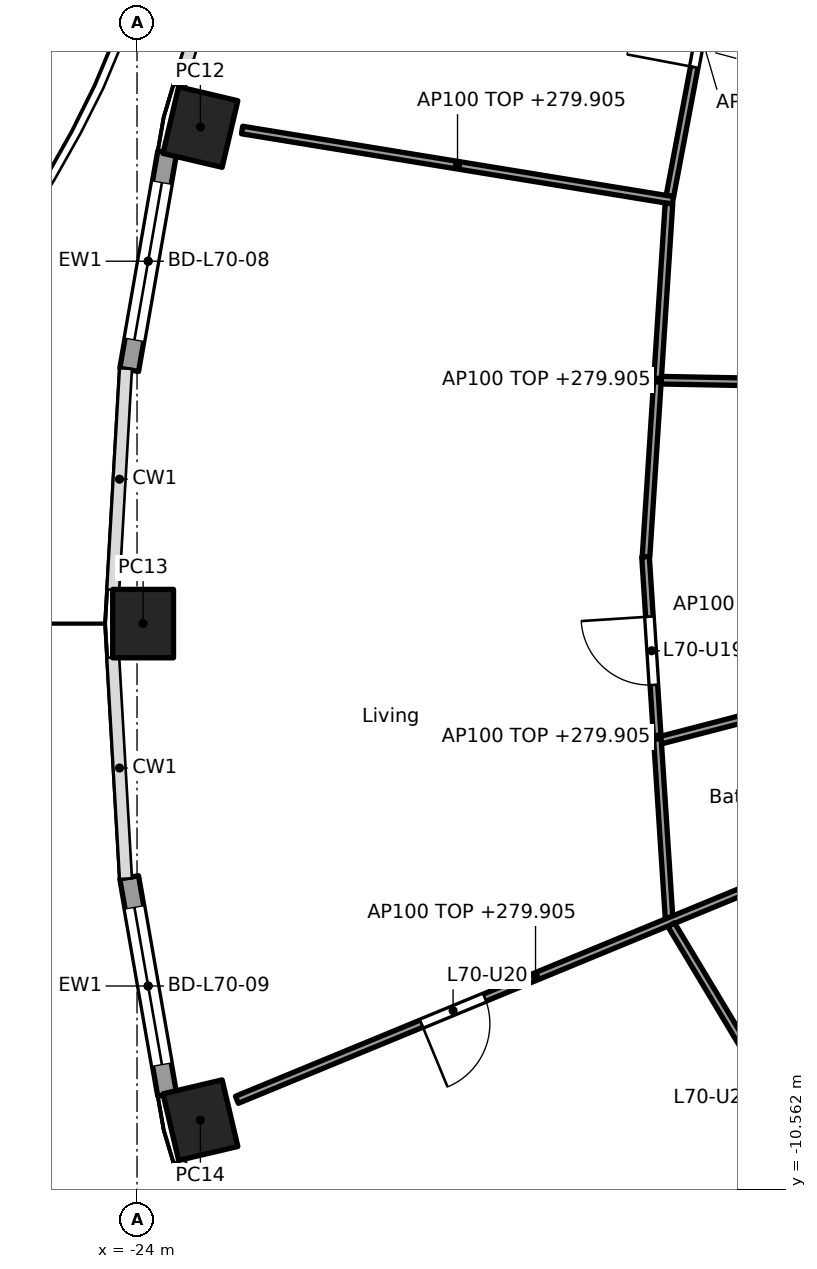
"""IFC4 building model, lengths in metres.
Left out: names, types, materials, properties, quantities, classifications, styles, units other than length and angle.
Written with IfcOpenShell. Run it as: python <this file> out.ifc"""

import sys

from ifc_helpers import new_model, si_unit, direction, frame, frame_2d, origin, origin_2d, place, context, subcontext, project, spatial, rectangle, hollow_rectangle, extrude, element, fill, save


model = new_model("IFC4")
c1 = context("Model", 3, precision=1e-05, world=origin(), true_north=direction((0.0, 1.0)))
c2 = subcontext(c1, "Body", "Model", "MODEL_VIEW")
j1 = project(units=[si_unit("LENGTHUNIT", "METRE"), si_unit("PLANEANGLEUNIT", "RADIAN")], contexts=[c1])
p1 = place(None, origin())
s1 = spatial("IfcSite", under=j1, at=p1, CompositionType="ELEMENT")
p2 = place(p1, origin())
s2 = spatial("IfcBuilding", under=s1, at=p2, CompositionType="ELEMENT")
p3 = place(p2, frame((0.0, 0.0, 277.0)))
s3 = spatial("IfcBuildingStorey", under=s2, at=p3, CompositionType="ELEMENT", Elevation=277.0)
for number, where, z_axis, x_axis in (
    (1, (-23.166, 3.415, 0.0), (0.0, 0.0, 1.0), (-0.229, -0.973, 0.0)),
    (2, (-23.92, -3.118, 0.0), (0.0, 0.0, 1.0), (0.0, -1.0, 0.0)),
    (3, (-23.166, -9.65, 0.0), (0.0, 0.0, 1.0), (0.229, -0.973, 0.0)),
):
    element("IfcColumn", number, at=place(p3, frame(where, z_axis=z_axis, x_axis=x_axis)), inside=s3, PredefinedType="COLUMN", context=c2, shape_type="SweptSolid", body=[
        extrude(hollow_rectangle(XDim=0.9, YDim=0.8, WallThickness=0.028, at=origin_2d()), origin(), (0.0, 0.0, 1.0), 3.7),
    ])
p4 = place(p3, frame((-24.103, 0.22, 0.0), z_axis=(0.0, 0.0, 1.0), x_axis=(0.172182411767, 0.985065082661, 0.0)))
e4 = element("IfcWall", 4, at=p4, inside=s3, PredefinedType="SOLIDWALL", context=c2, shape_type="SweptSolid", body=[
    extrude(rectangle(XDim=2.903, YDim=0.25, at=frame_2d((1.451, 0.0))), origin(), (0.0, 0.0, 1.0), 3.44),
])
p5 = place(p4, frame((0.401, 0.0, 0.0)))
e5 = element("IfcOpeningElement", 5, at=p5, cuts=e4, PredefinedType="OPENING", context=c2, shape_type="SweptSolid", body=[
    extrude(rectangle(XDim=2.1, YDim=2.4, at=frame_2d((1.05, 1.2))), frame((0.0, 0.135, 0.0), z_axis=(0.0, -1.0, 0.0), x_axis=(1.0, 0.0, 0.0)), (0.0, 0.0, 1.0), 0.27),
])
p6 = place(p3, frame((-23.604, -9.315, 0.0), z_axis=(0.0, 0.0, 1.0), x_axis=(-0.172182411767, 0.985065082661, 0.0)))
e6 = element("IfcWall", 6, at=p6, inside=s3, PredefinedType="SOLIDWALL", context=c2, shape_type="SweptSolid", body=[
    extrude(rectangle(XDim=2.903, YDim=0.25, at=frame_2d((1.451, 0.0))), origin(), (0.0, 0.0, 1.0), 3.44),
])
p7 = place(p6, frame((0.401, 0.0, 0.0)))
e7 = element("IfcOpeningElement", 7, at=p7, cuts=e6, PredefinedType="OPENING", context=c2, shape_type="SweptSolid", body=[
    extrude(rectangle(XDim=2.1, YDim=2.4, at=frame_2d((1.05, 1.2))), frame((0.0, 0.135, 0.0), z_axis=(0.0, -1.0, 0.0), x_axis=(1.0, 0.0, 0.0)), (0.0, 0.0, 1.0), 0.27),
])
p8 = place(p3, frame((-16.181, 6.783, 0.0), z_axis=(0.0, 0.0, 1.0), x_axis=(-0.185670583745, -0.982612046706, 0.0)))
e8 = element("IfcWall", 8, at=p8, inside=s3, PredefinedType="PARTITIONING", context=c2, shape_type="SweptSolid", body=[
    extrude(rectangle(XDim=4.351, YDim=0.1, at=frame_2d((2.176, 0.0))), origin(), (0.0, 0.0, 1.0), 2.905),
])
p9 = place(p8, frame((1.726, 0.0, 0.0)))
e9 = element("IfcOpeningElement", 9, at=p9, cuts=e8, PredefinedType="OPENING", context=c2, shape_type="SweptSolid", body=[
    extrude(rectangle(XDim=0.9, YDim=2.1, at=frame_2d((0.45, 1.05))), frame((0.0, 0.06, 0.0), z_axis=(0.0, -1.0, 0.0), x_axis=(1.0, 0.0, 0.0)), (0.0, 0.0, 1.0), 0.12),
])
p10 = place(p3, frame((-16.949, 2.451, 0.0), z_axis=(0.0, 0.0, 1.0), x_axis=(-0.986937570833, 0.161103169673, 0.0)))
e10 = element("IfcWall", 10, at=p10, inside=s3, PredefinedType="PARTITIONING", context=c2, shape_type="SweptSolid", body=[
    extrude(rectangle(XDim=5.743, YDim=0.1, at=frame_2d((2.872, 0.0))), origin(), (0.0, 0.0, 1.0), 2.905),
])
p11 = place(p3, frame((-17.002, 2.409, 0.0), z_axis=(0.0, 0.0, 1.0), x_axis=(-0.064855550758, -0.997894662545, 0.0)))
e11 = element("IfcWall", 11, at=p11, inside=s3, PredefinedType="PARTITIONING", context=c2, shape_type="SweptSolid", body=[
    extrude(rectangle(XDim=4.656, YDim=0.1, at=frame_2d((2.328, 0.0))), origin(), (0.0, 0.0, 1.0), 2.905),
])
p12 = place(p3, frame((-12.665, 0.002, 0.0), z_axis=(0.0, 0.0, 1.0), x_axis=(-0.999827178165, 0.018590691287, 0.0)))
e12 = element("IfcWall", 12, at=p12, inside=s3, PredefinedType="PARTITIONING", context=c2, shape_type="SweptSolid", body=[
    extrude(rectangle(XDim=4.439, YDim=0.1, at=frame_2d((2.219, 0.0))), origin(), (0.0, 0.0, 1.0), 2.762),
])
p13 = place(p12, frame((1.769, 0.0, 0.0)))
e13 = element("IfcOpeningElement", 13, at=p13, cuts=e12, PredefinedType="OPENING", context=c2, shape_type="SweptSolid", body=[
    extrude(rectangle(XDim=0.9, YDim=2.1, at=frame_2d((0.45, 1.05))), frame((0.0, 0.06, 0.0), z_axis=(0.0, -1.0, 0.0), x_axis=(1.0, 0.0, 0.0)), (0.0, 0.0, 1.0), 0.12),
])
p14 = place(p3, frame((-17.31, -2.238, 0.0), z_axis=(0.0, 0.0, 1.0), x_axis=(0.064949202176, -0.997888571503, 0.0)))
e14 = element("IfcWall", 14, at=p14, inside=s3, PredefinedType="PARTITIONING", context=c2, shape_type="SweptSolid", body=[
    extrude(rectangle(XDim=4.759, YDim=0.1, at=frame_2d((2.379, 0.0))), origin(), (0.0, 0.0, 1.0), 2.905),
])
p15 = place(p14, frame((0.79, 0.0, 0.0)))
e15 = element("IfcOpeningElement", 15, at=p15, cuts=e14, PredefinedType="OPENING", context=c2, shape_type="SweptSolid", body=[
    extrude(rectangle(XDim=0.9, YDim=2.1, at=frame_2d((0.45, 1.05))), frame((0.0, 0.06, 0.0), z_axis=(0.0, -1.0, 0.0), x_axis=(1.0, 0.0, 0.0)), (0.0, 0.0, 1.0), 0.12),
])
p16 = place(p3, frame((-12.662, -3.495, 0.0), z_axis=(0.0, 0.0, 1.0), x_axis=(-0.967834941053, -0.251586022817, 0.0)))
e16 = element("IfcWall", 16, at=p16, inside=s3, PredefinedType="PARTITIONING", context=c2, shape_type="SweptSolid", body=[
    extrude(rectangle(XDim=4.59, YDim=0.1, at=frame_2d((2.295, 0.0))), origin(), (0.0, 0.0, 1.0), 2.762),
])
p17 = place(p16, frame((0.5, 0.0, 0.0)))
e17 = element("IfcOpeningElement", 17, at=p17, cuts=e16, PredefinedType="OPENING", context=c2, shape_type="SweptSolid", body=[
    extrude(rectangle(XDim=0.9, YDim=2.1, at=frame_2d((0.45, 1.05))), frame((0.0, 0.06, 0.0), z_axis=(0.0, -1.0, 0.0), x_axis=(1.0, 0.0, 0.0)), (0.0, 0.0, 1.0), 0.12),
])
p18 = place(p3, frame((-14.828, -6.142, 0.0), z_axis=(0.0, 0.0, 1.0), x_axis=(-0.924478087429, -0.381235184451, 0.0)))
e18 = element("IfcWall", 18, at=p18, inside=s3, PredefinedType="PARTITIONING", context=c2, shape_type="SweptSolid", body=[
    extrude(rectangle(XDim=8.499, YDim=0.1, at=frame_2d((4.25, 0.0))), origin(), (0.0, 0.0, 1.0), 2.905),
])
p19 = place(p18, frame((4.973, 0.0, 0.0)))
e19 = element("IfcOpeningElement", 19, at=p19, cuts=e18, PredefinedType="OPENING", context=c2, shape_type="SweptSolid", body=[
    extrude(rectangle(XDim=0.9, YDim=2.1, at=frame_2d((0.45, 1.05))), frame((0.0, 0.06, 0.0), z_axis=(0.0, -1.0, 0.0), x_axis=(1.0, 0.0, 0.0)), (0.0, 0.0, 1.0), 0.12),
])
p20 = place(p3, frame((-16.972, -7.08, 0.0), z_axis=(0.0, 0.0, 1.0), x_axis=(0.514989049311, -0.857196756346, 0.0)))
e20 = element("IfcWall", 20, at=p20, inside=s3, PredefinedType="PARTITIONING", context=c2, shape_type="SweptSolid", body=[
    extrude(rectangle(XDim=4.512, YDim=0.1, at=frame_2d((2.256, 0.0))), origin(), (0.0, 0.0, 1.0), 2.905),
])
p21 = place(p20, frame((1.806, 0.0, 0.0)))
e21 = element("IfcOpeningElement", 21, at=p21, cuts=e20, PredefinedType="OPENING", context=c2, shape_type="SweptSolid", body=[
    extrude(rectangle(XDim=0.9, YDim=2.1, at=frame_2d((0.45, 1.05))), frame((0.0, 0.06, 0.0), z_axis=(0.0, -1.0, 0.0), x_axis=(1.0, 0.0, 0.0)), (0.0, 0.0, 1.0), 0.12),
])
p22 = place(p5, origin())
e22 = element("IfcDoor", 22, at=p22, inside=s3, OperationType="SLIDING_TO_LEFT", PredefinedType="DOOR", context=c2, shape_type="SweptSolid", body=[
    extrude(rectangle(XDim=2.1, YDim=2.4, at=frame_2d((1.05, 1.2))), frame((0.0, 0.025, 0.0), z_axis=(0.0, -1.0, 0.0), x_axis=(1.0, 0.0, 0.0)), (0.0, 0.0, 1.0), 0.05),
])
fill(e5, e22)
p23 = place(p7, origin())
e23 = element("IfcDoor", 23, at=p23, inside=s3, OperationType="SLIDING_TO_LEFT", PredefinedType="DOOR", context=c2, shape_type="SweptSolid", body=[
    extrude(rectangle(XDim=2.1, YDim=2.4, at=frame_2d((1.05, 1.2))), frame((0.0, 0.025, 0.0), z_axis=(0.0, -1.0, 0.0), x_axis=(1.0, 0.0, 0.0)), (0.0, 0.0, 1.0), 0.05),
])
fill(e7, e23)
p24 = place(p9, frame((0.9, 0.0, 0.0), x_axis=(-1.0, 0.0, 0.0)))
e24 = element("IfcDoor", 24, at=p24, inside=s3, OperationType="SINGLE_SWING_LEFT", PredefinedType="DOOR", context=c2, shape_type="SweptSolid", body=[
    extrude(rectangle(XDim=0.9, YDim=2.1, at=frame_2d((0.45, 1.05))), frame((0.0, 0.025, 0.0), z_axis=(0.0, -1.0, 0.0), x_axis=(1.0, 0.0, 0.0)), (0.0, 0.0, 1.0), 0.05),
])
fill(e9, e24)
p25 = place(p15, frame((0.9, 0.0, 0.0), x_axis=(-1.0, 0.0, 0.0)))
e25 = element("IfcDoor", 25, at=p25, inside=s3, OperationType="SINGLE_SWING_RIGHT", PredefinedType="DOOR", context=c2, shape_type="SweptSolid", body=[
    extrude(rectangle(XDim=0.9, YDim=2.1, at=frame_2d((0.45, 1.05))), frame((0.0, 0.025, 0.0), z_axis=(0.0, -1.0, 0.0), x_axis=(1.0, 0.0, 0.0)), (0.0, 0.0, 1.0), 0.05),
])
fill(e15, e25)
p26 = place(p19, origin())
e26 = element("IfcDoor", 26, at=p26, inside=s3, OperationType="SINGLE_SWING_RIGHT", PredefinedType="DOOR", context=c2, shape_type="SweptSolid", body=[
    extrude(rectangle(XDim=0.9, YDim=2.1, at=frame_2d((0.45, 1.05))), frame((0.0, 0.025, 0.0), z_axis=(0.0, -1.0, 0.0), x_axis=(1.0, 0.0, 0.0)), (0.0, 0.0, 1.0), 0.05),
])
fill(e19, e26)
save(model, sys.argv[1])
